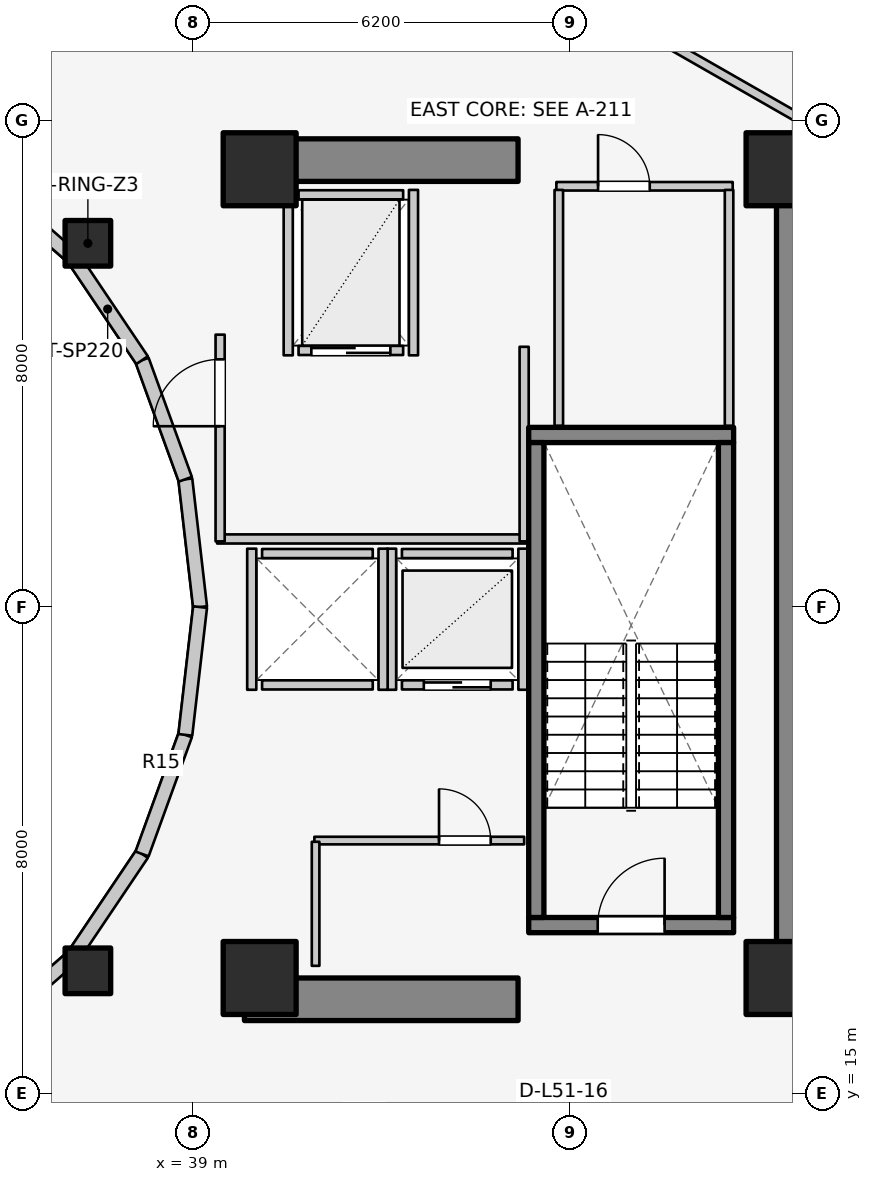
"""IFC4 building model, lengths in metres.
Left out: names, types, materials, properties, quantities, classifications, styles, units other than length and angle.
Written with IfcOpenShell. Run it as: python <this file> out.ifc"""

import sys

from ifc_helpers import new_model, si_unit, direction, frame, frame_2d, origin, origin_2d, place, context, subcontext, project, spatial, rectangle, extrude, element, fill, save


model = new_model("IFC4")
c1 = context("Model", 3, precision=1e-05, world=origin(), true_north=direction((0.0, 1.0)))
c2 = subcontext(c1, "Body", "Model", "MODEL_VIEW")
j1 = project(units=[si_unit("LENGTHUNIT", "METRE"), si_unit("PLANEANGLEUNIT", "RADIAN")], contexts=[c1])
p1 = place(None, origin())
s1 = spatial("IfcSite", under=j1, at=p1, CompositionType="ELEMENT")
p2 = place(p1, origin())
s2 = spatial("IfcBuilding", under=s1, at=p2, CompositionType="ELEMENT")
p3 = place(p2, frame((0.0, 0.0, 168.4)))
s3 = spatial("IfcBuildingStorey", under=s2, at=p3, CompositionType="ELEMENT", Elevation=168.4)
p4 = place(p3, frame((48.95, 17.05, 0.0), z_axis=(0.0, 0.0, 1.0), x_axis=(0.0, 1.0, 0.0)))
e1 = element("IfcWall", 1, at=p4, inside=s3, PredefinedType="SHEAR", context=c2, shape_type="SweptSolid", body=[
    extrude(rectangle(XDim=12.8, YDim=0.7, at=frame_2d((6.4, 0.0))), origin(), (0.0, 0.0, 1.0), 3.1),
])
for number, where, z_axis, x_axis in (
    (2, (39.85, 16.55, 0.0), (0.0, 0.0, 1.0), (1.0, 0.0, 0.0)),
    (3, (39.85, 30.35, 0.0), (0.0, 0.0, 1.0), (1.0, 0.0, 0.0)),
):
    element("IfcWall", number, at=place(p3, frame(where, z_axis=z_axis, x_axis=x_axis)), inside=s3, PredefinedType="SHEAR", context=c2, shape_type="SweptSolid", body=[
        extrude(rectangle(XDim=4.5, YDim=0.7, at=frame_2d((2.25, 0.0))), origin(), (0.0, 0.0, 1.0), 3.1),
    ])
p5 = place(p3, frame((44.525, 17.77, 0.0), z_axis=(0.0, 0.0, 1.0), x_axis=(1.0, 0.0, 0.0)))
e4 = element("IfcWall", 4, at=p5, inside=s3, PredefinedType="SOLIDWALL", context=c2, shape_type="SweptSolid", body=[
    extrude(rectangle(XDim=3.37, YDim=0.25, at=frame_2d((1.685, 0.0))), origin(), (0.0, 0.0, 1.0), 3.1),
])
p6 = place(p5, frame((1.135, 0.0, 0.0)))
e5 = element("IfcOpeningElement", 5, at=p6, cuts=e4, PredefinedType="OPENING", context=c2, shape_type="SweptSolid", body=[
    extrude(rectangle(XDim=1.1, YDim=2.1, at=frame_2d((0.55, 1.05))), frame((0.0, 0.135, 0.0), z_axis=(0.0, -1.0, 0.0), x_axis=(1.0, 0.0, 0.0)), (0.0, 0.0, 1.0), 0.27),
])
p7 = place(p3, frame((44.525, 25.83, 0.0), z_axis=(0.0, 0.0, 1.0), x_axis=(1.0, 0.0, 0.0)))
e6 = element("IfcWall", 6, at=p7, inside=s3, PredefinedType="SOLIDWALL", context=c2, shape_type="SweptSolid", body=[
    extrude(rectangle(XDim=3.37, YDim=0.25, at=frame_2d((1.685, 0.0))), origin(), (0.0, 0.0, 1.0), 3.1),
])
for number, where, z_axis, x_axis in (
    (7, (44.65, 17.895, 0.0), (0.0, 0.0, 1.0), (0.0, 1.0, 0.0)),
    (8, (47.77, 17.895, 0.0), (0.0, 0.0, 1.0), (0.0, 1.0, 0.0)),
):
    element("IfcWall", number, at=place(p3, frame(where, z_axis=z_axis, x_axis=x_axis)), inside=s3, PredefinedType="SOLIDWALL", context=c2, shape_type="SweptSolid", body=[
        extrude(rectangle(XDim=7.81, YDim=0.25, at=frame_2d((3.905, 0.0))), origin(), (0.0, 0.0, 1.0), 3.1),
    ])
for number, where, z_axis, x_axis in (
    (9, (40.1, 16.9, 0.0), (0.0, 0.0, 1.0), (1.0, 0.0, 0.0)),
    (10, (48.7, 16.9, 0.0), (0.0, 0.0, 1.0), (1.0, 0.0, 0.0)),
    (11, (48.7, 30.2, 0.0), (0.0, 0.0, 1.0), (1.0, 0.0, 0.0)),
    (12, (40.1, 30.2, 0.0), (0.0, 0.0, 1.0), (1.0, 0.0, 0.0)),
):
    element("IfcColumn", number, at=place(p3, frame(where, z_axis=z_axis, x_axis=x_axis)), inside=s3, PredefinedType="COLUMN", context=c2, shape_type="SweptSolid", body=[
        extrude(rectangle(XDim=1.2, YDim=1.2, at=origin_2d()), origin(), (0.0, 0.0, 1.0), 3.1),
    ])
for number, where, z_axis, x_axis in (
    (13, (37.275, 28.982, 0.0), (0.0, 0.0, 1.0), (1.0, 0.0, 0.0)),
    (14, (37.275, 17.018, 0.0), (0.0, 0.0, 1.0), (1.0, 0.0, 0.0)),
):
    element("IfcColumn", number, at=place(p3, frame(where, z_axis=z_axis, x_axis=x_axis)), inside=s3, PredefinedType="COLUMN", context=c2, shape_type="SweptSolid", body=[
        extrude(rectangle(XDim=0.75, YDim=0.75, at=origin_2d()), origin(), (0.0, 0.0, 1.0), 3.1),
    ])
p8 = place(p3, frame((39.12, 23.0, 0.0), z_axis=(0.0, 0.0, 1.0), x_axis=(-0.114711713601, 0.993398823617, 0.0)))
e15 = element("IfcWall", 15, at=p8, inside=s3, PredefinedType="STANDARD", context=c2, shape_type="SweptSolid", body=[
    extrude(rectangle(XDim=2.115, YDim=0.23, at=frame_2d((1.058, 0.0))), origin(), (0.0, 0.0, 1.0), 2.56),
])
p9 = place(p3, frame((38.877, 25.102, 0.0), z_axis=(0.0, 0.0, 1.0), x_axis=(-0.341423187295, 0.93990968033, 0.0)))
e16 = element("IfcWall", 16, at=p9, inside=s3, PredefinedType="STANDARD", context=c2, shape_type="SweptSolid", body=[
    extrude(rectangle(XDim=2.084, YDim=0.23, at=frame_2d((1.042, 0.0))), origin(), (0.0, 0.0, 1.0), 2.56),
])
p10 = place(p3, frame((38.166, 27.06, 0.0), z_axis=(0.0, 0.0, 1.0), x_axis=(-0.558197800898, 0.829707909492, 0.0)))
e17 = element("IfcWall", 17, at=p10, inside=s3, PredefinedType="STANDARD", context=c2, shape_type="SweptSolid", body=[
    extrude(rectangle(XDim=2.027, YDim=0.23, at=frame_2d((1.013, 0.0))), origin(), (0.0, 0.0, 1.0), 1.22),
])
for number, where, z_axis, x_axis in (
    (18, (37.035, 28.742, 0.0), (0.0, 0.0, 1.0), (-0.753, 0.659, 0.0)),
    (19, (35.56, 15.968, 0.0), (0.0, 0.0, 1.0), (0.753, 0.659, 0.0)),
):
    element("IfcWall", number, at=place(p3, frame(where, z_axis=z_axis, x_axis=x_axis)), inside=s3, PredefinedType="STANDARD", context=c2, shape_type="SweptSolid", body=[
        extrude(rectangle(XDim=1.959, YDim=0.23, at=frame_2d((0.98, 0.0))), origin(), (0.0, 0.0, 1.0), 1.22),
    ])
p11 = place(p3, frame((37.035, 17.258, 0.0), z_axis=(0.0, 0.0, 1.0), x_axis=(0.558197800898, 0.829707909492, 0.0)))
e20 = element("IfcWall", 20, at=p11, inside=s3, PredefinedType="STANDARD", context=c2, shape_type="SweptSolid", body=[
    extrude(rectangle(XDim=2.027, YDim=0.23, at=frame_2d((1.013, 0.0))), origin(), (0.0, 0.0, 1.0), 1.22),
])
p12 = place(p3, frame((38.166, 18.94, 0.0), z_axis=(0.0, 0.0, 1.0), x_axis=(0.341423187295, 0.93990968033, 0.0)))
e21 = element("IfcWall", 21, at=p12, inside=s3, PredefinedType="STANDARD", context=c2, shape_type="SweptSolid", body=[
    extrude(rectangle(XDim=2.084, YDim=0.23, at=frame_2d((1.042, 0.0))), origin(), (0.0, 0.0, 1.0), 2.56),
])
p13 = place(p3, frame((38.877, 20.898, 0.0), z_axis=(0.0, 0.0, 1.0), x_axis=(0.114711713601, 0.993398823617, 0.0)))
e22 = element("IfcWall", 22, at=p13, inside=s3, PredefinedType="STANDARD", context=c2, shape_type="SweptSolid", body=[
    extrude(rectangle(XDim=2.115, YDim=0.23, at=frame_2d((1.058, 0.0))), origin(), (0.0, 0.0, 1.0), 2.56),
])
p14 = place(p3, frame((42.44, 21.72, 0.0), z_axis=(0.0, 0.0, 1.0), x_axis=(1.0, 0.0, 0.0)))
e23 = element("IfcWall", 23, at=p14, inside=s3, PredefinedType="SOLIDWALL", context=c2, shape_type="SweptSolid", body=[
    extrude(rectangle(XDim=1.82, YDim=0.15, at=frame_2d((0.91, 0.0))), origin(), (0.0, 0.0, 1.0), 2.575),
])
p15 = place(p14, frame((0.36, 0.0, 0.0)))
e24 = element("IfcOpeningElement", 24, at=p15, cuts=e23, PredefinedType="OPENING", context=c2, shape_type="SweptSolid", body=[
    extrude(rectangle(XDim=1.1, YDim=2.1, at=frame_2d((0.55, 1.05))), frame((0.0, 0.085, 0.0), z_axis=(0.0, -1.0, 0.0), x_axis=(1.0, 0.0, 0.0)), (0.0, 0.0, 1.0), 0.17),
])
p16 = place(p3, frame((42.44, 23.88, 0.0), z_axis=(0.0, 0.0, 1.0), x_axis=(1.0, 0.0, 0.0)))
e25 = element("IfcWall", 25, at=p16, inside=s3, PredefinedType="SOLIDWALL", context=c2, shape_type="SweptSolid", body=[
    extrude(rectangle(XDim=1.82, YDim=0.15, at=frame_2d((0.91, 0.0))), origin(), (0.0, 0.0, 1.0), 2.575),
])
for number, where, z_axis, x_axis in (
    (26, (42.27, 21.64, 0.0), (0.0, 0.0, 1.0), (0.0, 1.0, 0.0)),
    (27, (44.43, 21.64, 0.0), (0.0, 0.0, 1.0), (0.0, 1.0, 0.0)),
):
    element("IfcWall", number, at=place(p3, frame(where, z_axis=z_axis, x_axis=x_axis)), inside=s3, PredefinedType="SOLIDWALL", context=c2, shape_type="SweptSolid", body=[
        extrude(rectangle(XDim=2.32, YDim=0.15, at=frame_2d((1.16, 0.0))), origin(), (0.0, 0.0, 1.0), 2.575),
    ])
for number, where, z_axis, x_axis in (
    (28, (40.14, 21.72, 0.0), (0.0, 0.0, 1.0), (1.0, 0.0, 0.0)),
    (29, (40.14, 23.88, 0.0), (0.0, 0.0, 1.0), (1.0, 0.0, 0.0)),
):
    element("IfcWall", number, at=place(p3, frame(where, z_axis=z_axis, x_axis=x_axis)), inside=s3, PredefinedType="SOLIDWALL", context=c2, shape_type="SweptSolid", body=[
        extrude(rectangle(XDim=1.82, YDim=0.15, at=frame_2d((0.91, 0.0))), origin(), (0.0, 0.0, 1.0), 2.12),
    ])
p17 = place(p3, frame((39.97, 21.64, 0.0), z_axis=(0.0, 0.0, 1.0), x_axis=(0.0, 1.0, 0.0)))
e30 = element("IfcWall", 30, at=p17, inside=s3, PredefinedType="SOLIDWALL", context=c2, shape_type="SweptSolid", body=[
    extrude(rectangle(XDim=2.32, YDim=0.15, at=frame_2d((1.16, 0.0))), origin(), (0.0, 0.0, 1.0), 2.12),
])
p18 = place(p3, frame((42.13, 21.64, 0.0), z_axis=(0.0, 0.0, 1.0), x_axis=(0.0, 1.0, 0.0)))
e31 = element("IfcWall", 31, at=p18, inside=s3, PredefinedType="SOLIDWALL", context=c2, shape_type="SweptSolid", body=[
    extrude(rectangle(XDim=2.32, YDim=0.15, at=frame_2d((1.16, 0.0))), origin(), (0.0, 0.0, 1.0), 2.575),
])
p19 = place(p3, frame((40.74, 27.22, 0.0), z_axis=(0.0, 0.0, 1.0), x_axis=(1.0, 0.0, 0.0)))
e32 = element("IfcWall", 32, at=p19, inside=s3, PredefinedType="SOLIDWALL", context=c2, shape_type="SweptSolid", body=[
    extrude(rectangle(XDim=1.72, YDim=0.15, at=frame_2d((0.86, 0.0))), origin(), (0.0, 0.0, 1.0), 2.575),
])
p20 = place(p19, frame((0.21, 0.0, 0.0)))
e33 = element("IfcOpeningElement", 33, at=p20, cuts=e32, PredefinedType="OPENING", context=c2, shape_type="SweptSolid", body=[
    extrude(rectangle(XDim=1.3, YDim=2.1, at=frame_2d((0.65, 1.05))), frame((0.0, 0.085, 0.0), z_axis=(0.0, -1.0, 0.0), x_axis=(1.0, 0.0, 0.0)), (0.0, 0.0, 1.0), 0.17),
])
p21 = place(p3, frame((40.74, 29.78, 0.0), z_axis=(0.0, 0.0, 1.0), x_axis=(1.0, 0.0, 0.0)))
e34 = element("IfcWall", 34, at=p21, inside=s3, PredefinedType="SOLIDWALL", context=c2, shape_type="SweptSolid", body=[
    extrude(rectangle(XDim=1.72, YDim=0.15, at=frame_2d((0.86, 0.0))), origin(), (0.0, 0.0, 1.0), 2.575),
])
for number, where, z_axis, x_axis in (
    (35, (40.57, 27.14, 0.0), (0.0, 0.0, 1.0), (0.0, 1.0, 0.0)),
    (36, (42.63, 27.14, 0.0), (0.0, 0.0, 1.0), (0.0, 1.0, 0.0)),
):
    element("IfcWall", number, at=place(p3, frame(where, z_axis=z_axis, x_axis=x_axis)), inside=s3, PredefinedType="SOLIDWALL", context=c2, shape_type="SweptSolid", body=[
        extrude(rectangle(XDim=2.72, YDim=0.15, at=frame_2d((1.36, 0.0))), origin(), (0.0, 0.0, 1.0), 2.575),
    ])
p22 = place(p3, frame((39.4, 24.12, 0.0), z_axis=(0.0, 0.0, 1.0), x_axis=(1.0, 0.0, 0.0)))
e37 = element("IfcWall", 37, at=p22, inside=s3, PredefinedType="PARTITIONING", context=c2, shape_type="SweptSolid", body=[
    extrude(rectangle(XDim=5.08, YDim=0.15, at=frame_2d((2.54, 0.0))), origin(), (0.0, 0.0, 1.0), 2.12),
])
p23 = place(p3, frame((44.45, 24.08, 0.0), z_axis=(0.0, 0.0, 1.0), x_axis=(0.0, 1.0, 0.0)))
e38 = element("IfcWall", 38, at=p23, inside=s3, PredefinedType="PARTITIONING", context=c2, shape_type="SweptSolid", body=[
    extrude(rectangle(XDim=3.2, YDim=0.15, at=frame_2d((1.6, 0.0))), origin(), (0.0, 0.0, 1.0), 2.575),
])
p24 = place(p3, frame((39.45, 24.08, 0.0), z_axis=(0.0, 0.0, 1.0), x_axis=(0.0, 1.0, 0.0)))
e39 = element("IfcWall", 39, at=p24, inside=s3, PredefinedType="PARTITIONING", context=c2, shape_type="SweptSolid", body=[
    extrude(rectangle(XDim=3.4, YDim=0.15, at=frame_2d((1.7, 0.0))), origin(), (0.0, 0.0, 1.0), 2.575),
])
p25 = place(p24, frame((1.894, 0.0, 0.0)))
e40 = element("IfcOpeningElement", 40, at=p25, cuts=e39, PredefinedType="OPENING", context=c2, shape_type="SweptSolid", body=[
    extrude(rectangle(XDim=1.1, YDim=2.1, at=frame_2d((0.55, 1.05))), frame((0.0, 0.085, 0.0), z_axis=(0.0, -1.0, 0.0), x_axis=(1.0, 0.0, 0.0)), (0.0, 0.0, 1.0), 0.17),
])
p26 = place(p3, frame((41.0, 19.16, 0.0), z_axis=(0.0, 0.0, 1.0), x_axis=(1.0, 0.0, 0.0)))
e41 = element("IfcWall", 41, at=p26, inside=s3, PredefinedType="PARTITIONING", context=c2, shape_type="SweptSolid", body=[
    extrude(rectangle(XDim=3.45, YDim=0.125, at=frame_2d((1.725, 0.0))), origin(), (0.0, 0.0, 1.0), 2.12),
])
p27 = place(p26, frame((2.05, 0.0, 0.0)))
e42 = element("IfcOpeningElement", 42, at=p27, cuts=e41, PredefinedType="OPENING", context=c2, shape_type="SweptSolid", body=[
    extrude(rectangle(XDim=0.85, YDim=2.05, at=frame_2d((0.425, 1.025))), frame((0.0, 0.073, 0.0), z_axis=(0.0, -1.0, 0.0), x_axis=(1.0, 0.0, 0.0)), (0.0, 0.0, 1.0), 0.145),
])
p28 = place(p3, frame((41.02, 17.1, 0.0), z_axis=(0.0, 0.0, 1.0), x_axis=(0.0, 1.0, 0.0)))
e43 = element("IfcWall", 43, at=p28, inside=s3, PredefinedType="PARTITIONING", context=c2, shape_type="SweptSolid", body=[
    extrude(rectangle(XDim=2.04, YDim=0.125, at=frame_2d((1.02, 0.0))), origin(), (0.0, 0.0, 1.0), 2.575),
])
p29 = place(p3, frame((44.98, 29.92, 0.0), z_axis=(0.0, 0.0, 1.0), x_axis=(1.0, 0.0, 0.0)))
e44 = element("IfcWall", 44, at=p29, inside=s3, PredefinedType="PLUMBINGWALL", context=c2, shape_type="SweptSolid", body=[
    extrude(rectangle(XDim=2.9, YDim=0.14, at=frame_2d((1.45, 0.0))), origin(), (0.0, 0.0, 1.0), 2.575),
])
p30 = place(p29, frame((0.686, 0.0, 0.0)))
e45 = element("IfcOpeningElement", 45, at=p30, cuts=e44, PredefinedType="OPENING", context=c2, shape_type="SweptSolid", body=[
    extrude(rectangle(XDim=0.85, YDim=2.05, at=frame_2d((0.425, 1.025))), frame((0.0, 0.08, 0.0), z_axis=(0.0, -1.0, 0.0), x_axis=(1.0, 0.0, 0.0)), (0.0, 0.0, 1.0), 0.16),
])
for number, where, z_axis, x_axis in (
    (46, (45.02, 25.98, 0.0), (0.0, 0.0, 1.0), (0.0, 1.0, 0.0)),
    (47, (47.82, 25.98, 0.0), (0.0, 0.0, 1.0), (0.0, 1.0, 0.0)),
):
    element("IfcWall", number, at=place(p3, frame(where, z_axis=z_axis, x_axis=x_axis)), inside=s3, PredefinedType="PLUMBINGWALL", context=c2, shape_type="SweptSolid", body=[
        extrude(rectangle(XDim=3.88, YDim=0.14, at=frame_2d((1.94, 0.0))), origin(), (0.0, 0.0, 1.0), 2.575),
    ])
p31 = place(p3, frame((46.757, 32.305, 0.0), z_axis=(0.0, 0.0, 1.0), x_axis=(0.867991349648, -0.496579315857, 0.0)))
e48 = element("IfcWall", 48, at=p31, inside=s3, PredefinedType="PARTITIONING", context=c2, shape_type="SweptSolid", body=[
    extrude(rectangle(XDim=2.567, YDim=0.15, at=frame_2d((1.283, 0.0))), origin(), (0.0, 0.0, 1.0), 1.22),
])
p32 = place(p3, frame((35.55, 15.985, 0.0), z_axis=(0.0, 0.0, 1.0), x_axis=(0.524565340045, -0.851370192116, 0.0)))
e49 = element("IfcWall", 49, at=p32, inside=s3, PredefinedType="PARTITIONING", context=c2, shape_type="SweptSolid", body=[
    extrude(rectangle(XDim=3.027, YDim=0.125, at=frame_2d((1.514, 0.0))), origin(), (0.0, 0.0, 1.0), 1.22),
])
p33 = place(p6, origin())
e50 = element("IfcDoor", 50, at=p33, inside=s3, OperationType="SINGLE_SWING_RIGHT", PredefinedType="DOOR", context=c2, shape_type="SweptSolid", body=[
    extrude(rectangle(XDim=1.1, YDim=2.1, at=frame_2d((0.55, 1.05))), frame((0.0, 0.025, 0.0), z_axis=(0.0, -1.0, 0.0), x_axis=(1.0, 0.0, 0.0)), (0.0, 0.0, 1.0), 0.05),
])
fill(e5, e50)
p34 = place(p15, origin())
e51 = element("IfcDoor", 51, at=p34, inside=s3, OperationType="DOUBLE_DOOR_SLIDING", PredefinedType="DOOR", context=c2, shape_type="SweptSolid", body=[
    extrude(rectangle(XDim=1.1, YDim=2.1, at=frame_2d((0.55, 1.05))), frame((0.0, 0.025, 0.0), z_axis=(0.0, -1.0, 0.0), x_axis=(1.0, 0.0, 0.0)), (0.0, 0.0, 1.0), 0.05),
])
fill(e24, e51)
p35 = place(p20, origin())
e52 = element("IfcDoor", 52, at=p35, inside=s3, OperationType="DOUBLE_DOOR_SLIDING", PredefinedType="DOOR", context=c2, shape_type="SweptSolid", body=[
    extrude(rectangle(XDim=1.3, YDim=2.1, at=frame_2d((0.65, 1.05))), frame((0.0, 0.025, 0.0), z_axis=(0.0, -1.0, 0.0), x_axis=(1.0, 0.0, 0.0)), (0.0, 0.0, 1.0), 0.05),
])
fill(e33, e52)
p36 = place(p25, origin())
e53 = element("IfcDoor", 53, at=p36, inside=s3, OperationType="SINGLE_SWING_LEFT", PredefinedType="DOOR", context=c2, shape_type="SweptSolid", body=[
    extrude(rectangle(XDim=1.1, YDim=2.1, at=frame_2d((0.55, 1.05))), frame((0.0, 0.025, 0.0), z_axis=(0.0, -1.0, 0.0), x_axis=(1.0, 0.0, 0.0)), (0.0, 0.0, 1.0), 0.05),
])
fill(e40, e53)
p37 = place(p27, origin())
e54 = element("IfcDoor", 54, at=p37, inside=s3, OperationType="SINGLE_SWING_LEFT", PredefinedType="DOOR", context=c2, shape_type="SweptSolid", body=[
    extrude(rectangle(XDim=0.85, YDim=2.05, at=frame_2d((0.425, 1.025))), frame((0.0, 0.025, 0.0), z_axis=(0.0, -1.0, 0.0), x_axis=(1.0, 0.0, 0.0)), (0.0, 0.0, 1.0), 0.05),
])
fill(e42, e54)
p38 = place(p30, origin())
e55 = element("IfcDoor", 55, at=p38, inside=s3, OperationType="SINGLE_SWING_LEFT", PredefinedType="DOOR", context=c2, shape_type="SweptSolid", body=[
    extrude(rectangle(XDim=0.85, YDim=2.05, at=frame_2d((0.425, 1.025))), frame((0.0, 0.025, 0.0), z_axis=(0.0, -1.0, 0.0), x_axis=(1.0, 0.0, 0.0)), (0.0, 0.0, 1.0), 0.05),
])
fill(e45, e55)
save(model, sys.argv[1])
